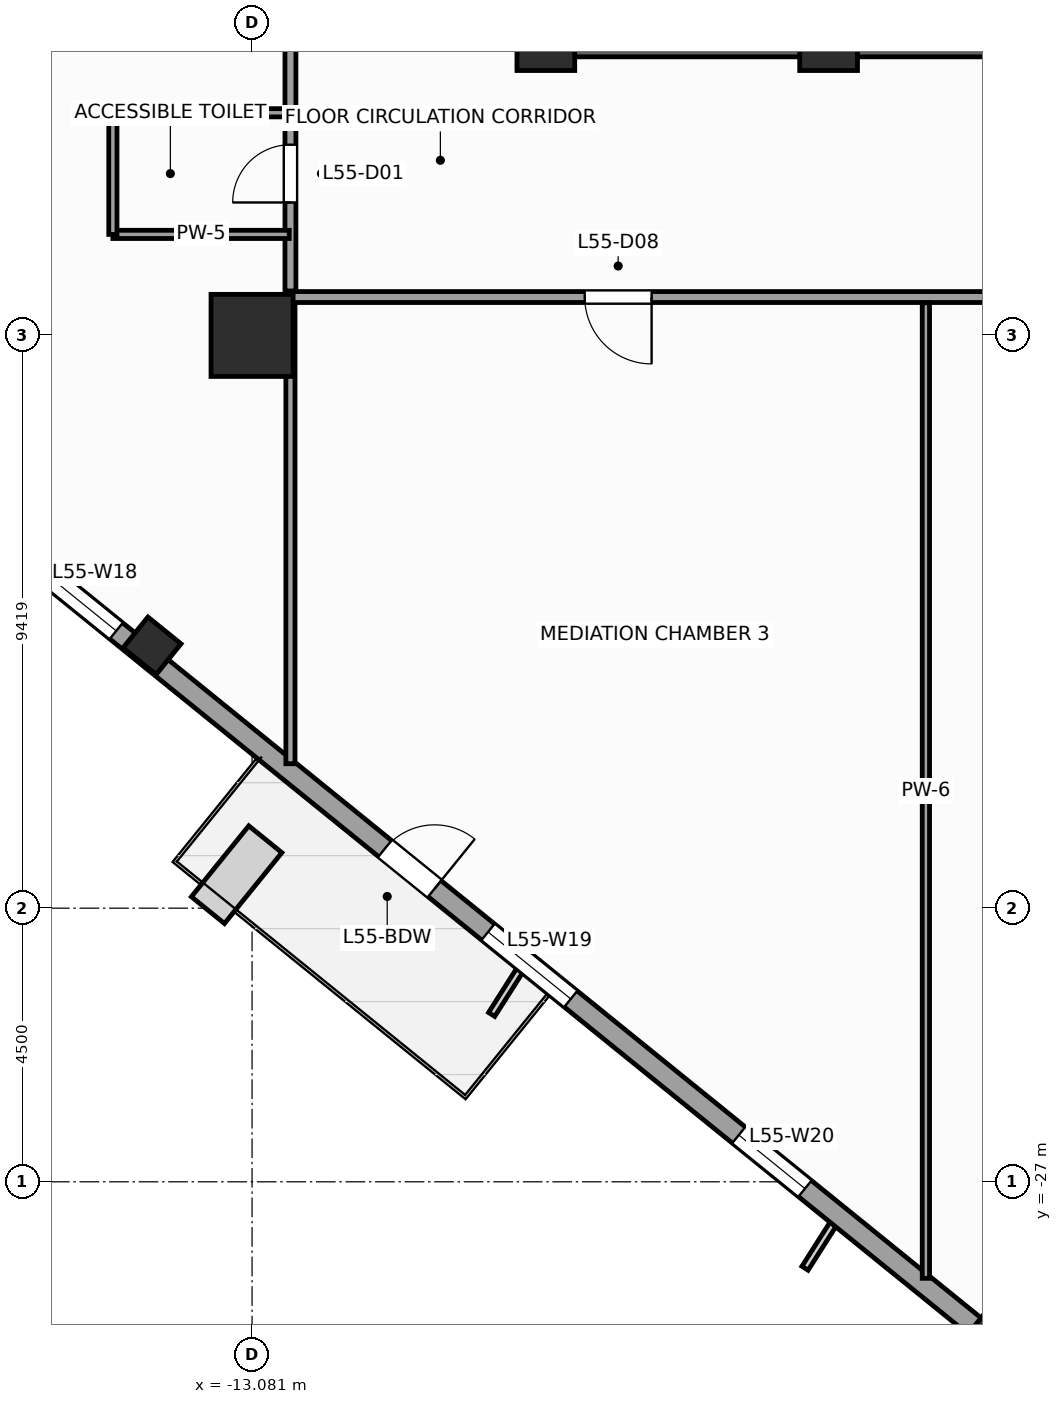
"""IFC4 building model, lengths in metres.
Left out: names, types, materials, properties, quantities, classifications, styles, units other than length and angle.
Written with IfcOpenShell. Run it as: python <this file> out.ifc"""

import sys

from ifc_helpers import new_model, si_unit, direction, frame, frame_2d, origin, origin_2d, place, context, subcontext, project, spatial, rectangle, extrude, source, transform, mapped, element, fill, save


model = new_model("IFC4")
c1 = context("Model", 3, precision=1e-05, world=origin(), true_north=direction((0.0, 1.0)))
c2 = subcontext(c1, "Body", "Model", "MODEL_VIEW")
j1 = project(units=[si_unit("LENGTHUNIT", "METRE"), si_unit("PLANEANGLEUNIT", "RADIAN")], contexts=[c1])
p1 = place(None, origin())
s1 = spatial("IfcSite", under=j1, at=p1, CompositionType="ELEMENT")
p2 = place(p1, origin())
s2 = spatial("IfcBuilding", under=s1, at=p2, CompositionType="ELEMENT")
p3 = place(p2, frame((0.0, 0.0, 229.0)))
s3 = spatial("IfcBuildingStorey", under=s2, at=p3, CompositionType="ELEMENT", Elevation=229.0)
p4 = place(p3, frame((-8.5, -8.25, 0.0), z_axis=(0.0, 0.0, 1.0), x_axis=(1.0, 0.0, 0.0)))
e1 = element("IfcWall", 1, at=p4, inside=s3, PredefinedType="SHEAR", context=c2, shape_type="SweptSolid", body=[
    extrude(rectangle(XDim=17.0, YDim=0.5, at=frame_2d((8.5, 0.0))), origin(), (0.0, 0.0, 1.0), 3.9),
])
p5 = place(p4, frame((7.85, 0.0, 0.0)))
e2 = element("IfcOpeningElement", 2, at=p5, cuts=e1, PredefinedType="OPENING", context=c2, shape_type="SweptSolid", body=[
    extrude(rectangle(XDim=1.3, YDim=2.2, at=frame_2d((0.65, 1.1))), frame((0.0, 0.26, 0.0), z_axis=(0.0, -1.0, 0.0), x_axis=(1.0, 0.0, 0.0)), (0.0, 0.0, 1.0), 0.52),
])
m1 = source(origin(), c2, "Body", "SweptSolid", [
    extrude(rectangle(XDim=0.95, YDim=0.95, at=origin_2d()), origin(), (0.0, 0.0, 1.0), 3.9),
])
for number, where, z_axis, x_axis in (
    (3, (-8.25, -8.25, 0.0), (0.0, 0.0, 1.0), (1.0, 0.0, 0.0)),
    (4, (-3.6, -8.25, 0.0), (0.0, 0.0, 1.0), (1.0, 0.0, 0.0)),
):
    element("IfcColumn", number, at=place(p3, frame(where, z_axis=z_axis, x_axis=x_axis)), inside=s3, PredefinedType="PILASTER", context=c2, shape_type="MappedRepresentation", body=[
        mapped(m1, transform((0.0, 0.0, 0.0), scale=1.0)),
    ])
m2 = source(origin(), c2, "Body", "SweptSolid", [
    extrude(rectangle(XDim=1.35, YDim=1.35, at=origin_2d()), origin(), (0.0, 0.0, 1.0), 3.9),
])
p6 = place(p3, frame((-13.081, -13.081, 0.0), z_axis=(0.0, 0.0, 1.0), x_axis=(1.0, 0.0, 0.0)))
e5 = element("IfcColumn", 5, at=p6, inside=s3, PredefinedType="COLUMN", context=c2, shape_type="MappedRepresentation", body=[
    mapped(m2, transform((0.0, 0.0, 0.0), scale=1.0)),
])
m3 = source(origin(), c2, "Body", "SweptSolid", [
    extrude(rectangle(XDim=0.65, YDim=0.7, at=origin_2d()), origin(), (0.0, 0.0, 1.0), 3.9),
])
for number, where, z_axis, x_axis in (
    (6, (-14.726, -18.185, 0.0), (0.0, 0.0, 1.0), (0.629, 0.777, 0.0)),
    (7, (-0.815, -29.45, 0.0), (0.0, 0.0, 1.0), (0.629, 0.777, 0.0)),
):
    element("IfcColumn", number, at=place(p3, frame(where, z_axis=z_axis, x_axis=x_axis)), inside=s3, PredefinedType="COLUMN", context=c2, shape_type="MappedRepresentation", body=[
        mapped(m3, transform((0.0, 0.0, 0.0), scale=1.0)),
    ])
p7 = place(p3, frame((-29.154, -6.733, 0.0), z_axis=(0.0, 0.0, 1.0), x_axis=(0.77714192302, -0.629325378072, 0.0)))
e8 = element("IfcWall", 8, at=p7, inside=s3, PredefinedType="STANDARD", context=c2, shape_type="SweptSolid", body=[
    extrude(rectangle(XDim=36.84, YDim=0.34, at=frame_2d((18.42, 0.0))), origin(), (0.0, 0.0, 1.0), 2.96),
])
p8 = place(p7, frame((23.495, 0.0, 0.0)))
e9 = element("IfcOpeningElement", 9, at=p8, cuts=e8, PredefinedType="OPENING", context=c2, shape_type="SweptSolid", body=[
    extrude(rectangle(XDim=1.05, YDim=2.25, at=frame_2d((0.525, 1.125))), frame((0.0, 0.18, 0.0), z_axis=(0.0, -1.0, 0.0), x_axis=(1.0, 0.0, 0.0)), (0.0, 0.0, 1.0), 0.36),
])
p9 = place(p7, frame((3.721, 0.0, 0.48)))
e10 = element("IfcOpeningElement", 10, at=p9, cuts=e8, PredefinedType="OPENING", context=c2, shape_type="SweptSolid", body=[
    extrude(rectangle(XDim=1.4, YDim=2.4, at=frame_2d((0.7, 1.2))), frame((0.0, 0.18, 0.0), z_axis=(0.0, -1.0, 0.0), x_axis=(1.0, 0.0, 0.0)), (0.0, 0.0, 1.0), 0.36),
])
p10 = place(p7, frame((9.809, 0.0, 0.58)))
e11 = element("IfcOpeningElement", 11, at=p10, cuts=e8, PredefinedType="OPENING", context=c2, shape_type="SweptSolid", body=[
    extrude(rectangle(XDim=1.75, YDim=2.3, at=frame_2d((0.875, 1.15))), frame((0.0, 0.18, 0.0), z_axis=(0.0, -1.0, 0.0), x_axis=(1.0, 0.0, 0.0)), (0.0, 0.0, 1.0), 0.36),
])
p11 = place(p7, frame((16.058, 0.0, 0.58)))
e12 = element("IfcOpeningElement", 12, at=p11, cuts=e8, PredefinedType="OPENING", context=c2, shape_type="SweptSolid", body=[
    extrude(rectangle(XDim=1.75, YDim=2.3, at=frame_2d((0.875, 1.15))), frame((0.0, 0.18, 0.0), z_axis=(0.0, -1.0, 0.0), x_axis=(1.0, 0.0, 0.0)), (0.0, 0.0, 1.0), 0.36),
])
p12 = place(p7, frame((25.676, 0.0, 0.58)))
e13 = element("IfcOpeningElement", 13, at=p12, cuts=e8, PredefinedType="OPENING", context=c2, shape_type="SweptSolid", body=[
    extrude(rectangle(XDim=1.75, YDim=2.3, at=frame_2d((0.875, 1.15))), frame((0.0, 0.18, 0.0), z_axis=(0.0, -1.0, 0.0), x_axis=(1.0, 0.0, 0.0)), (0.0, 0.0, 1.0), 0.36),
])
p13 = place(p7, frame((30.982, 0.0, 0.48)))
e14 = element("IfcOpeningElement", 14, at=p13, cuts=e8, PredefinedType="OPENING", context=c2, shape_type="SweptSolid", body=[
    extrude(rectangle(XDim=1.4, YDim=2.4, at=frame_2d((0.7, 1.2))), frame((0.0, 0.18, 0.0), z_axis=(0.0, -1.0, 0.0), x_axis=(1.0, 0.0, 0.0)), (0.0, 0.0, 1.0), 0.36),
])
p14 = place(p3, frame((-12.45, -12.45, 0.0), z_axis=(0.0, 0.0, 1.0), x_axis=(1.0, 0.0, 0.0)))
e15 = element("IfcWall", 15, at=p14, inside=s3, PredefinedType="PARTITIONING", context=c2, shape_type="SweptSolid", body=[
    extrude(rectangle(XDim=24.9, YDim=0.18, at=frame_2d((12.45, 0.0))), origin(), (0.0, 0.0, 1.0), 3.66),
])
p15 = place(p14, frame((4.839, 0.0, 0.0)))
e16 = element("IfcOpeningElement", 16, at=p15, cuts=e15, PredefinedType="OPENING", context=c2, shape_type="SweptSolid", body=[
    extrude(rectangle(XDim=1.1, YDim=2.2, at=frame_2d((0.55, 1.1))), frame((0.0, 0.1, 0.0), z_axis=(0.0, -1.0, 0.0), x_axis=(1.0, 0.0, 0.0)), (0.0, 0.0, 1.0), 0.2),
])
p16 = place(p14, frame((13.15, 0.0, 0.0)))
e17 = element("IfcOpeningElement", 17, at=p16, cuts=e15, PredefinedType="OPENING", context=c2, shape_type="SweptSolid", body=[
    extrude(rectangle(XDim=1.1, YDim=2.2, at=frame_2d((0.55, 1.1))), frame((0.0, 0.1, 0.0), z_axis=(0.0, -1.0, 0.0), x_axis=(1.0, 0.0, 0.0)), (0.0, 0.0, 1.0), 0.2),
])
p17 = place(p14, frame((20.21, 0.0, 0.0)))
e18 = element("IfcOpeningElement", 18, at=p17, cuts=e15, PredefinedType="OPENING", context=c2, shape_type="SweptSolid", body=[
    extrude(rectangle(XDim=1.1, YDim=2.2, at=frame_2d((0.55, 1.1))), frame((0.0, 0.1, 0.0), z_axis=(0.0, -1.0, 0.0), x_axis=(1.0, 0.0, 0.0)), (0.0, 0.0, 1.0), 0.2),
])
p18 = place(p3, frame((-12.45, -12.35, 0.0), z_axis=(0.0, 0.0, 1.0), x_axis=(0.0, 1.0, 0.0)))
e19 = element("IfcWall", 19, at=p18, inside=s3, PredefinedType="PARTITIONING", context=c2, shape_type="SweptSolid", body=[
    extrude(rectangle(XDim=16.15, YDim=0.18, at=frame_2d((8.075, 0.0))), origin(), (0.0, 0.0, 1.0), 3.66),
])
p19 = place(p18, frame((1.455, 0.0, 0.0)))
e20 = element("IfcOpeningElement", 20, at=p19, cuts=e19, PredefinedType="OPENING", context=c2, shape_type="SweptSolid", body=[
    extrude(rectangle(XDim=0.95, YDim=2.1, at=frame_2d((0.475, 1.05))), frame((0.0, 0.1, 0.0), z_axis=(0.0, -1.0, 0.0), x_axis=(1.0, 0.0, 0.0)), (0.0, 0.0, 1.0), 0.2),
])
p20 = place(p18, frame((14.111, 0.0, 0.0)))
e21 = element("IfcOpeningElement", 21, at=p20, cuts=e19, PredefinedType="OPENING", context=c2, shape_type="SweptSolid", body=[
    extrude(rectangle(XDim=1.1, YDim=2.2, at=frame_2d((0.55, 1.1))), frame((0.0, 0.1, 0.0), z_axis=(0.0, -1.0, 0.0), x_axis=(1.0, 0.0, 0.0)), (0.0, 0.0, 1.0), 0.2),
])
p21 = place(p18, frame((7.659, 0.0, 0.0)))
e22 = element("IfcOpeningElement", 22, at=p21, cuts=e19, PredefinedType="OPENING", context=c2, shape_type="SweptSolid", body=[
    extrude(rectangle(XDim=1.1, YDim=2.2, at=frame_2d((0.55, 1.1))), frame((0.0, 0.1, 0.0), z_axis=(0.0, -1.0, 0.0), x_axis=(1.0, 0.0, 0.0)), (0.0, 0.0, 1.0), 0.2),
])
p22 = place(p3, frame((-12.45, -20.125, 0.0), z_axis=(0.0, 0.0, 1.0), x_axis=(0.0, 1.0, 0.0)))
e23 = element("IfcWall", 23, at=p22, inside=s3, PredefinedType="PARTITIONING", context=c2, shape_type="SweptSolid", body=[
    extrude(rectangle(XDim=7.58, YDim=0.15, at=frame_2d((3.79, 0.0))), origin(), (0.0, 0.0, 1.0), 3.66),
])
p23 = place(p3, frame((-2.0, -28.587, 0.0), z_axis=(0.0, 0.0, 1.0), x_axis=(0.0, 1.0, 0.0)))
e24 = element("IfcWall", 24, at=p23, inside=s3, PredefinedType="PARTITIONING", context=c2, shape_type="SweptSolid", body=[
    extrude(rectangle(XDim=16.042, YDim=0.12, at=frame_2d((8.021, 0.0))), origin(), (0.0, 0.0, 1.0), 3.66),
])
for number, where, z_axis, x_axis in (
    (25, (-15.37, -11.42, 0.0), (0.0, 0.0, 1.0), (1.0, 0.0, 0.0)),
    (26, (-15.37, -9.42, 0.0), (0.0, 0.0, 1.0), (1.0, 0.0, 0.0)),
):
    element("IfcWall", number, at=place(p3, frame(where, z_axis=z_axis, x_axis=x_axis)), inside=s3, PredefinedType="PARTITIONING", context=c2, shape_type="SweptSolid", body=[
        extrude(rectangle(XDim=2.9, YDim=0.135, at=frame_2d((1.45, 0.0))), origin(), (0.0, 0.0, 1.0), 3.66),
    ])
p24 = place(p3, frame((-15.37, -11.42, 0.0), z_axis=(0.0, 0.0, 1.0), x_axis=(0.0, 1.0, 0.0)))
e27 = element("IfcWall", 27, at=p24, inside=s3, PredefinedType="PARTITIONING", context=c2, shape_type="SweptSolid", body=[
    extrude(rectangle(XDim=2.0, YDim=0.135, at=frame_2d((1.0, 0.0))), origin(), (0.0, 0.0, 1.0), 3.66),
])
m4 = source(origin(), c2, "Body", "SweptSolid", [
    extrude(rectangle(XDim=1.05, YDim=2.25, at=frame_2d((0.525, 1.125))), frame((0.0, 0.025, 0.0), z_axis=(0.0, -1.0, 0.0), x_axis=(1.0, 0.0, 0.0)), (0.0, 0.0, 1.0), 0.05),
])
p25 = place(p8, origin())
e28 = element("IfcDoor", 28, at=p25, inside=s3, OperationType="SINGLE_SWING_RIGHT", PredefinedType="DOOR", context=c2, shape_type="MappedRepresentation", body=[
    mapped(m4, transform((0.0, 0.0, 0.0), scale=1.0)),
])
fill(e9, e28)
m5 = source(origin(), c2, "Body", "SweptSolid", [
    extrude(rectangle(XDim=1.75, YDim=2.3, at=frame_2d((0.875, 1.15))), frame((0.0, 0.03, 0.0), z_axis=(0.0, -1.0, 0.0), x_axis=(1.0, 0.0, 0.0)), (0.0, 0.0, 1.0), 0.06),
])
p26 = place(p11, origin())
e29 = element("IfcWindow", 29, at=p26, inside=s3, PartitioningType="SINGLE_PANEL", PredefinedType="WINDOW", context=c2, shape_type="MappedRepresentation", body=[
    mapped(m5, transform((0.0, 0.0, 0.0), scale=1.0)),
])
fill(e12, e29)
p27 = place(p12, origin())
e30 = element("IfcWindow", 30, at=p27, inside=s3, PartitioningType="SINGLE_PANEL", PredefinedType="WINDOW", context=c2, shape_type="MappedRepresentation", body=[
    mapped(m5, transform((0.0, 0.0, 0.0), scale=1.0)),
])
fill(e13, e30)
m6 = source(origin(), c2, "Body", "SweptSolid", [
    extrude(rectangle(XDim=1.4, YDim=2.4, at=frame_2d((0.7, 1.2))), frame((0.0, 0.03, 0.0), z_axis=(0.0, -1.0, 0.0), x_axis=(1.0, 0.0, 0.0)), (0.0, 0.0, 1.0), 0.06),
])
p28 = place(p13, origin())
e31 = element("IfcWindow", 31, at=p28, inside=s3, PartitioningType="SINGLE_PANEL", PredefinedType="WINDOW", context=c2, shape_type="MappedRepresentation", body=[
    mapped(m6, transform((0.0, 0.0, 0.0), scale=1.0)),
])
fill(e14, e31)
m7 = source(origin(), c2, "Body", "SweptSolid", [
    extrude(rectangle(XDim=0.95, YDim=2.1, at=frame_2d((0.475, 1.05))), frame((0.0, 0.025, 0.0), z_axis=(0.0, -1.0, 0.0), x_axis=(1.0, 0.0, 0.0)), (0.0, 0.0, 1.0), 0.05),
])
p29 = place(p19, origin())
e32 = element("IfcDoor", 32, at=p29, inside=s3, OperationType="SINGLE_SWING_LEFT", PredefinedType="DOOR", context=c2, shape_type="MappedRepresentation", body=[
    mapped(m7, transform((0.0, 0.0, 0.0), scale=1.0)),
])
fill(e20, e32)
m8 = source(origin(), c2, "Body", "SweptSolid", [
    extrude(rectangle(XDim=1.1, YDim=2.2, at=frame_2d((0.55, 1.1))), frame((0.0, 0.025, 0.0), z_axis=(0.0, -1.0, 0.0), x_axis=(1.0, 0.0, 0.0)), (0.0, 0.0, 1.0), 0.05),
])
p30 = place(p15, frame((1.1, 0.0, 0.0), z_axis=(0.0, 0.0, 1.0), x_axis=(-1.0, 0.0, 0.0)))
e33 = element("IfcDoor", 33, at=p30, inside=s3, OperationType="SINGLE_SWING_RIGHT", PredefinedType="DOOR", context=c2, shape_type="MappedRepresentation", body=[
    mapped(m8, transform((0.0, 0.0, 0.0), scale=1.0)),
])
fill(e16, e33)
save(model, sys.argv[1])
